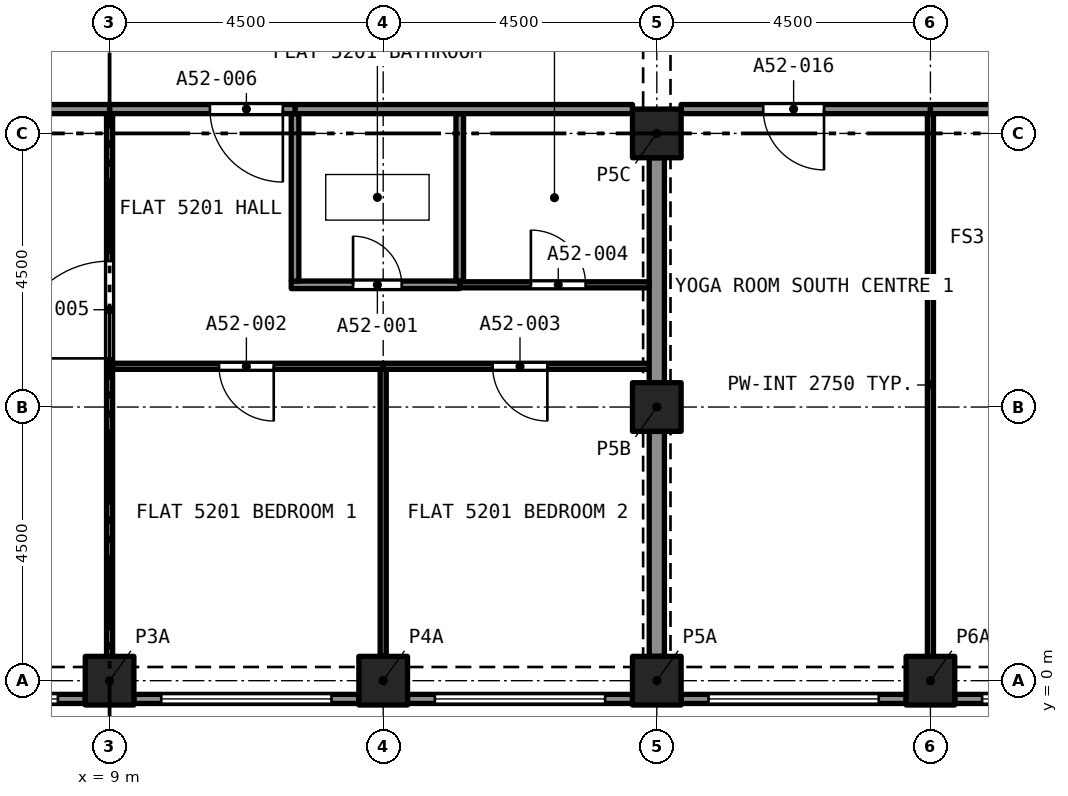
"""IFC4 building model, lengths in metres.
Left out: names, types, materials, properties, quantities, classifications, styles, units other than length and angle.
Written with IfcOpenShell. Run it as: python <this file> out.ifc"""

import sys

from ifc_helpers import new_model, si_unit, direction, frame, frame_2d, origin, origin_2d, place, context, subcontext, project, spatial, rectangle, extrude, element, fill, save


model = new_model("IFC4")
c1 = context("Model", 3, precision=1e-05, world=origin(), true_north=direction((0.0, 1.0)))
c2 = subcontext(c1, "Body", "Model", "MODEL_VIEW")
j1 = project(units=[si_unit("LENGTHUNIT", "METRE"), si_unit("PLANEANGLEUNIT", "RADIAN")], contexts=[c1])
p1 = place(None, origin())
s1 = spatial("IfcSite", under=j1, at=p1, CompositionType="ELEMENT")
p2 = place(p1, origin())
s2 = spatial("IfcBuilding", under=s1, at=p2, CompositionType="ELEMENT")
p3 = place(p2, frame((0.0, 0.0, 189.1)))
s3 = spatial("IfcBuildingStorey", under=s2, at=p3, CompositionType="ELEMENT", Elevation=189.1)
for number, where, z_axis, x_axis in (
    (1, (9.0, 0.0, 0.0), (0.0, 0.0, 1.0), (1.0, 0.0, 0.0)),
    (2, (13.5, 0.0, 0.0), (0.0, 0.0, 1.0), (1.0, 0.0, 0.0)),
    (3, (18.0, 0.0, 0.0), (0.0, 0.0, 1.0), (1.0, 0.0, 0.0)),
    (4, (22.5, 0.0, 0.0), (0.0, 0.0, 1.0), (1.0, 0.0, 0.0)),
    (5, (18.0, 4.5, 0.0), (0.0, 0.0, 1.0), (1.0, 0.0, 0.0)),
    (6, (18.0, 9.0, 0.0), (0.0, 0.0, 1.0), (1.0, 0.0, 0.0)),
):
    element("IfcColumn", number, at=place(p3, frame(where, z_axis=z_axis, x_axis=x_axis)), inside=s3, PredefinedType="COLUMN", context=c2, shape_type="SweptSolid", body=[
        extrude(rectangle(XDim=0.8, YDim=0.8, at=origin_2d()), origin(), (0.0, 0.0, 1.0), 3.2),
    ])
p4 = place(p3, frame((8.6, -0.3, 0.0), z_axis=(0.0, 0.0, 1.0), x_axis=(-1.0, 0.0, 0.0)))
e7 = element("IfcWall", 7, at=p4, inside=s3, PredefinedType="SOLIDWALL", context=c2, shape_type="SweptSolid", body=[
    extrude(rectangle(XDim=3.7, YDim=0.15, at=frame_2d((1.85, 0.0))), origin(), (0.0, 0.0, 1.0), 3.2),
])
p5 = place(p4, frame((0.45, 0.0, 0.45)))
e8 = element("IfcOpeningElement", 8, at=p5, cuts=e7, PredefinedType="OPENING", context=c2, shape_type="SweptSolid", body=[
    extrude(rectangle(XDim=2.8, YDim=1.95, at=frame_2d((1.4, 0.975))), frame((0.0, 0.085, 0.0), z_axis=(0.0, -1.0, 0.0), x_axis=(1.0, 0.0, 0.0)), (0.0, 0.0, 1.0), 0.17),
])
p6 = place(p3, frame((13.1, -0.3, 0.0), z_axis=(0.0, 0.0, 1.0), x_axis=(-1.0, 0.0, 0.0)))
e9 = element("IfcWall", 9, at=p6, inside=s3, PredefinedType="SOLIDWALL", context=c2, shape_type="SweptSolid", body=[
    extrude(rectangle(XDim=3.7, YDim=0.15, at=frame_2d((1.85, 0.0))), origin(), (0.0, 0.0, 1.0), 3.2),
])
p7 = place(p6, frame((0.45, 0.0, 0.45)))
e10 = element("IfcOpeningElement", 10, at=p7, cuts=e9, PredefinedType="OPENING", context=c2, shape_type="SweptSolid", body=[
    extrude(rectangle(XDim=2.8, YDim=1.95, at=frame_2d((1.4, 0.975))), frame((0.0, 0.085, 0.0), z_axis=(0.0, -1.0, 0.0), x_axis=(1.0, 0.0, 0.0)), (0.0, 0.0, 1.0), 0.17),
])
p8 = place(p3, frame((17.6, -0.3, 0.0), z_axis=(0.0, 0.0, 1.0), x_axis=(-1.0, 0.0, 0.0)))
e11 = element("IfcWall", 11, at=p8, inside=s3, PredefinedType="SOLIDWALL", context=c2, shape_type="SweptSolid", body=[
    extrude(rectangle(XDim=3.7, YDim=0.15, at=frame_2d((1.85, 0.0))), origin(), (0.0, 0.0, 1.0), 3.2),
])
p9 = place(p8, frame((0.45, 0.0, 0.45)))
e12 = element("IfcOpeningElement", 12, at=p9, cuts=e11, PredefinedType="OPENING", context=c2, shape_type="SweptSolid", body=[
    extrude(rectangle(XDim=2.8, YDim=1.95, at=frame_2d((1.4, 0.975))), frame((0.0, 0.085, 0.0), z_axis=(0.0, -1.0, 0.0), x_axis=(1.0, 0.0, 0.0)), (0.0, 0.0, 1.0), 0.17),
])
p10 = place(p3, frame((22.1, -0.3, 0.0), z_axis=(0.0, 0.0, 1.0), x_axis=(-1.0, 0.0, 0.0)))
e13 = element("IfcWall", 13, at=p10, inside=s3, PredefinedType="SOLIDWALL", context=c2, shape_type="SweptSolid", body=[
    extrude(rectangle(XDim=3.7, YDim=0.15, at=frame_2d((1.85, 0.0))), origin(), (0.0, 0.0, 1.0), 3.2),
])
p11 = place(p10, frame((0.45, 0.0, 0.45)))
e14 = element("IfcOpeningElement", 14, at=p11, cuts=e13, PredefinedType="OPENING", context=c2, shape_type="SweptSolid", body=[
    extrude(rectangle(XDim=2.8, YDim=1.95, at=frame_2d((1.4, 0.975))), frame((0.0, 0.085, 0.0), z_axis=(0.0, -1.0, 0.0), x_axis=(1.0, 0.0, 0.0)), (0.0, 0.0, 1.0), 0.17),
])
p12 = place(p3, frame((26.6, -0.3, 0.0), z_axis=(0.0, 0.0, 1.0), x_axis=(-1.0, 0.0, 0.0)))
e15 = element("IfcWall", 15, at=p12, inside=s3, PredefinedType="SOLIDWALL", context=c2, shape_type="SweptSolid", body=[
    extrude(rectangle(XDim=3.7, YDim=0.15, at=frame_2d((1.85, 0.0))), origin(), (0.0, 0.0, 1.0), 3.2),
])
p13 = place(p12, frame((0.45, 0.0, 0.45)))
e16 = element("IfcOpeningElement", 16, at=p13, cuts=e15, PredefinedType="OPENING", context=c2, shape_type="SweptSolid", body=[
    extrude(rectangle(XDim=2.8, YDim=1.95, at=frame_2d((1.4, 0.975))), frame((0.0, 0.085, 0.0), z_axis=(0.0, -1.0, 0.0), x_axis=(1.0, 0.0, 0.0)), (0.0, 0.0, 1.0), 0.17),
])
p14 = place(p3, frame((11.988, 6.51, 0.0), z_axis=(0.0, 0.0, 1.0), x_axis=(1.0, 0.0, 0.0)))
e17 = element("IfcWall", 17, at=p14, inside=s3, PredefinedType="PARTITIONING", context=c2, shape_type="SweptSolid", body=[
    extrude(rectangle(XDim=2.771, YDim=0.125, at=frame_2d((1.385, 0.0))), origin(), (0.0, 0.0, 1.0), 2.9),
])
p15 = place(p14, frame((1.017, 0.0, 0.0)))
e18 = element("IfcOpeningElement", 18, at=p15, cuts=e17, PredefinedType="OPENING", context=c2, shape_type="SweptSolid", body=[
    extrude(rectangle(XDim=0.8, YDim=2.1, at=frame_2d((0.4, 1.05))), frame((0.0, 0.073, 0.0), z_axis=(0.0, -1.0, 0.0), x_axis=(1.0, 0.0, 0.0)), (0.0, 0.0, 1.0), 0.145),
])
for number, where, z_axis, x_axis in (
    (19, (12.05, 6.573, 0.0), (0.0, 0.0, 1.0), (0.0, 1.0, 0.0)),
    (20, (14.759, 6.573, 0.0), (0.0, 0.0, 1.0), (0.0, 1.0, 0.0)),
):
    element("IfcWall", number, at=place(p3, frame(where, z_axis=z_axis, x_axis=x_axis)), inside=s3, PredefinedType="PARTITIONING", context=c2, shape_type="SweptSolid", body=[
        extrude(rectangle(XDim=2.752, YDim=0.125, at=frame_2d((1.376, 0.0))), origin(), (0.0, 0.0, 1.0), 2.9),
    ])
p16 = place(p3, frame((12.05, 9.4, 0.0), z_axis=(0.0, 0.0, 1.0), x_axis=(1.0, 0.0, 0.0)))
e21 = element("IfcWall", 21, at=p16, inside=s3, PredefinedType="PARTITIONING", context=c2, shape_type="SweptSolid", body=[
    extrude(rectangle(XDim=5.55, YDim=0.15, at=frame_2d((2.775, 0.0))), origin(), (0.0, 0.0, 1.0), 2.9),
])
p17 = place(p3, frame((13.5, 0.4, 0.0), z_axis=(0.0, 0.0, 1.0), x_axis=(0.0, 1.0, 0.0)))
e22 = element("IfcWall", 22, at=p17, inside=s3, PredefinedType="PARTITIONING", context=c2, shape_type="SweptSolid", body=[
    extrude(rectangle(XDim=4.72, YDim=0.1, at=frame_2d((2.36, 0.0))), origin(), (0.0, 0.0, 1.0), 2.9),
])
p18 = place(p3, frame((13.5, 5.17, 0.0), z_axis=(0.0, 0.0, 1.0), x_axis=(-1.0, 0.0, 0.0)))
e23 = element("IfcWall", 23, at=p18, inside=s3, PredefinedType="PARTITIONING", context=c2, shape_type="SweptSolid", body=[
    extrude(rectangle(XDim=4.45, YDim=0.1, at=frame_2d((2.225, 0.0))), origin(), (0.0, 0.0, 1.0), 2.9),
])
p19 = place(p18, frame((1.8, 0.0, 0.0)))
e24 = element("IfcOpeningElement", 24, at=p19, cuts=e23, PredefinedType="OPENING", context=c2, shape_type="SweptSolid", body=[
    extrude(rectangle(XDim=0.9, YDim=2.1, at=frame_2d((0.45, 1.05))), frame((0.0, 0.06, 0.0), z_axis=(0.0, -1.0, 0.0), x_axis=(1.0, 0.0, 0.0)), (0.0, 0.0, 1.0), 0.12),
])
p20 = place(p3, frame((9.0, 0.4, 0.0), z_axis=(0.0, 0.0, 1.0), x_axis=(0.0, 1.0, 0.0)))
e25 = element("IfcWall", 25, at=p20, inside=s3, PredefinedType="PARTITIONING", context=c2, shape_type="SweptSolid", body=[
    extrude(rectangle(XDim=4.77, YDim=0.1, at=frame_2d((2.385, 0.0))), origin(), (0.0, 0.0, 1.0), 2.9),
])
p21 = place(p3, frame((17.875, 5.17, 0.0), z_axis=(0.0, 0.0, 1.0), x_axis=(-1.0, 0.0, 0.0)))
e26 = element("IfcWall", 26, at=p21, inside=s3, PredefinedType="PARTITIONING", context=c2, shape_type="SweptSolid", body=[
    extrude(rectangle(XDim=4.375, YDim=0.1, at=frame_2d((2.188, 0.0))), origin(), (0.0, 0.0, 1.0), 2.9),
])
p22 = place(p21, frame((1.675, 0.0, 0.0)))
e27 = element("IfcOpeningElement", 27, at=p22, cuts=e26, PredefinedType="OPENING", context=c2, shape_type="SweptSolid", body=[
    extrude(rectangle(XDim=0.9, YDim=2.1, at=frame_2d((0.45, 1.05))), frame((0.0, 0.06, 0.0), z_axis=(0.0, -1.0, 0.0), x_axis=(1.0, 0.0, 0.0)), (0.0, 0.0, 1.0), 0.12),
])
for number, where, z_axis, x_axis in (
    (28, (18.0, 4.9, 0.0), (0.0, 0.0, 1.0), (0.0, 1.0, 0.0)),
    (29, (18.0, 0.4, 0.0), (0.0, 0.0, 1.0), (0.0, 1.0, 0.0)),
):
    element("IfcWall", number, at=place(p3, frame(where, z_axis=z_axis, x_axis=x_axis)), inside=s3, PredefinedType="PARTITIONING", context=c2, shape_type="SweptSolid", body=[
        extrude(rectangle(XDim=3.7, YDim=0.25, at=frame_2d((1.85, 0.0))), origin(), (0.0, 0.0, 1.0), 2.38),
    ])
p23 = place(p3, frame((14.759, 6.51, 0.0), z_axis=(0.0, 0.0, 1.0), x_axis=(1.0, 0.0, 0.0)))
e30 = element("IfcWall", 30, at=p23, inside=s3, PredefinedType="PARTITIONING", context=c2, shape_type="SweptSolid", body=[
    extrude(rectangle(XDim=3.116, YDim=0.1, at=frame_2d((1.558, 0.0))), origin(), (0.0, 0.0, 1.0), 2.9),
])
p24 = place(p23, frame((1.171, 0.0, 0.0)))
e31 = element("IfcOpeningElement", 31, at=p24, cuts=e30, PredefinedType="OPENING", context=c2, shape_type="SweptSolid", body=[
    extrude(rectangle(XDim=0.9, YDim=2.1, at=frame_2d((0.45, 1.05))), frame((0.0, 0.06, 0.0), z_axis=(0.0, -1.0, 0.0), x_axis=(1.0, 0.0, 0.0)), (0.0, 0.0, 1.0), 0.12),
])
p25 = place(p3, frame((9.0, 5.17, 0.0), z_axis=(0.0, 0.0, 1.0), x_axis=(0.0, 1.0, 0.0)))
e32 = element("IfcWall", 32, at=p25, inside=s3, PredefinedType="PARTITIONING", context=c2, shape_type="SweptSolid", body=[
    extrude(rectangle(XDim=4.155, YDim=0.1, at=frame_2d((2.078, 0.0))), origin(), (0.0, 0.0, 1.0), 2.9),
])
p26 = place(p25, frame((0.13, 0.0, 0.0)))
e33 = element("IfcOpeningElement", 33, at=p26, cuts=e32, PredefinedType="OPENING", context=c2, shape_type="SweptSolid", body=[
    extrude(rectangle(XDim=1.6, YDim=2.1, at=frame_2d((0.8, 1.05))), frame((0.0, 0.06, 0.0), z_axis=(0.0, -1.0, 0.0), x_axis=(1.0, 0.0, 0.0)), (0.0, 0.0, 1.0), 0.12),
])
p27 = place(p3, frame((12.05, 9.4, 0.0), z_axis=(0.0, 0.0, 1.0), x_axis=(-1.0, 0.0, 0.0)))
e34 = element("IfcWall", 34, at=p27, inside=s3, PredefinedType="PARTITIONING", context=c2, shape_type="SweptSolid", body=[
    extrude(rectangle(XDim=3.05, YDim=0.15, at=frame_2d((1.525, 0.0))), origin(), (0.0, 0.0, 1.0), 2.9),
])
p28 = place(p27, frame((0.2, 0.0, 0.0)))
e35 = element("IfcOpeningElement", 35, at=p28, cuts=e34, PredefinedType="OPENING", context=c2, shape_type="SweptSolid", body=[
    extrude(rectangle(XDim=1.2, YDim=2.4, at=frame_2d((0.6, 1.2))), frame((0.0, 0.085, 0.0), z_axis=(0.0, -1.0, 0.0), x_axis=(1.0, 0.0, 0.0)), (0.0, 0.0, 1.0), 0.17),
])
p29 = place(p3, frame((0.4, 9.4, 0.0), z_axis=(0.0, 0.0, 1.0), x_axis=(1.0, 0.0, 0.0)))
e36 = element("IfcWall", 36, at=p29, inside=s3, PredefinedType="PARTITIONING", context=c2, shape_type="SweptSolid", body=[
    extrude(rectangle(XDim=8.6, YDim=0.15, at=frame_2d((4.3, 0.0))), origin(), (0.0, 0.0, 1.0), 2.9),
])
p30 = place(p3, frame((22.5, 0.4, 0.0), z_axis=(0.0, 0.0, 1.0), x_axis=(0.0, 1.0, 0.0)))
e37 = element("IfcWall", 37, at=p30, inside=s3, PredefinedType="PARTITIONING", context=c2, shape_type="SweptSolid", body=[
    extrude(rectangle(XDim=8.925, YDim=0.1, at=frame_2d((4.462, 0.0))), origin(), (0.0, 0.0, 1.0), 2.75),
])
p31 = place(p3, frame((22.5, 9.4, 0.0), z_axis=(0.0, 0.0, 1.0), x_axis=(-1.0, 0.0, 0.0)))
e38 = element("IfcWall", 38, at=p31, inside=s3, PredefinedType="PARTITIONING", context=c2, shape_type="SweptSolid", body=[
    extrude(rectangle(XDim=4.1, YDim=0.15, at=frame_2d((2.05, 0.0))), origin(), (0.0, 0.0, 1.0), 2.75),
])
p32 = place(p31, frame((1.75, 0.0, 0.0)))
e39 = element("IfcOpeningElement", 39, at=p32, cuts=e38, PredefinedType="OPENING", context=c2, shape_type="SweptSolid", body=[
    extrude(rectangle(XDim=1.0, YDim=2.1, at=frame_2d((0.5, 1.05))), frame((0.0, 0.085, 0.0), z_axis=(0.0, -1.0, 0.0), x_axis=(1.0, 0.0, 0.0)), (0.0, 0.0, 1.0), 0.17),
])
p33 = place(p3, frame((31.1, 9.4, 0.0), z_axis=(0.0, 0.0, 1.0), x_axis=(-1.0, 0.0, 0.0)))
e40 = element("IfcWall", 40, at=p33, inside=s3, PredefinedType="PARTITIONING", context=c2, shape_type="SweptSolid", body=[
    extrude(rectangle(XDim=8.6, YDim=0.15, at=frame_2d((4.3, 0.0))), origin(), (0.0, 0.0, 1.0), 2.75),
])
p34 = place(p33, frame((3.8, 0.0, 0.0)))
e41 = element("IfcOpeningElement", 41, at=p34, cuts=e40, PredefinedType="OPENING", context=c2, shape_type="SweptSolid", body=[
    extrude(rectangle(XDim=1.0, YDim=2.1, at=frame_2d((0.5, 1.05))), frame((0.0, 0.085, 0.0), z_axis=(0.0, -1.0, 0.0), x_axis=(1.0, 0.0, 0.0)), (0.0, 0.0, 1.0), 0.17),
])
p35 = place(p5, origin())
e42 = element("IfcWindow", 42, at=p35, inside=s3, PartitioningType="SINGLE_PANEL", PredefinedType="WINDOW", context=c2, shape_type="SweptSolid", body=[
    extrude(rectangle(XDim=2.8, YDim=1.95, at=frame_2d((1.4, 0.975))), frame((0.0, 0.03, 0.0), z_axis=(0.0, -1.0, 0.0), x_axis=(1.0, 0.0, 0.0)), (0.0, 0.0, 1.0), 0.06),
])
fill(e8, e42)
p36 = place(p7, origin())
e43 = element("IfcWindow", 43, at=p36, inside=s3, PartitioningType="SINGLE_PANEL", PredefinedType="WINDOW", context=c2, shape_type="SweptSolid", body=[
    extrude(rectangle(XDim=2.8, YDim=1.95, at=frame_2d((1.4, 0.975))), frame((0.0, 0.03, 0.0), z_axis=(0.0, -1.0, 0.0), x_axis=(1.0, 0.0, 0.0)), (0.0, 0.0, 1.0), 0.06),
])
fill(e10, e43)
p37 = place(p9, origin())
e44 = element("IfcWindow", 44, at=p37, inside=s3, PartitioningType="SINGLE_PANEL", PredefinedType="WINDOW", context=c2, shape_type="SweptSolid", body=[
    extrude(rectangle(XDim=2.8, YDim=1.95, at=frame_2d((1.4, 0.975))), frame((0.0, 0.03, 0.0), z_axis=(0.0, -1.0, 0.0), x_axis=(1.0, 0.0, 0.0)), (0.0, 0.0, 1.0), 0.06),
])
fill(e12, e44)
p38 = place(p11, origin())
e45 = element("IfcWindow", 45, at=p38, inside=s3, PartitioningType="SINGLE_PANEL", PredefinedType="WINDOW", context=c2, shape_type="SweptSolid", body=[
    extrude(rectangle(XDim=2.8, YDim=1.95, at=frame_2d((1.4, 0.975))), frame((0.0, 0.03, 0.0), z_axis=(0.0, -1.0, 0.0), x_axis=(1.0, 0.0, 0.0)), (0.0, 0.0, 1.0), 0.06),
])
fill(e14, e45)
p39 = place(p13, origin())
e46 = element("IfcWindow", 46, at=p39, inside=s3, PartitioningType="SINGLE_PANEL", PredefinedType="WINDOW", context=c2, shape_type="SweptSolid", body=[
    extrude(rectangle(XDim=2.8, YDim=1.95, at=frame_2d((1.4, 0.975))), frame((0.0, 0.03, 0.0), z_axis=(0.0, -1.0, 0.0), x_axis=(1.0, 0.0, 0.0)), (0.0, 0.0, 1.0), 0.06),
])
fill(e16, e46)
p40 = place(p15, origin())
e47 = element("IfcDoor", 47, at=p40, inside=s3, OperationType="SINGLE_SWING_RIGHT", PredefinedType="DOOR", context=c2, shape_type="SweptSolid", body=[
    extrude(rectangle(XDim=0.8, YDim=2.1, at=frame_2d((0.4, 1.05))), frame((0.0, 0.025, 0.0), z_axis=(0.0, -1.0, 0.0), x_axis=(1.0, 0.0, 0.0)), (0.0, 0.0, 1.0), 0.05),
])
fill(e18, e47)
p41 = place(p19, origin())
e48 = element("IfcDoor", 48, at=p41, inside=s3, OperationType="SINGLE_SWING_RIGHT", PredefinedType="DOOR", context=c2, shape_type="SweptSolid", body=[
    extrude(rectangle(XDim=0.9, YDim=2.1, at=frame_2d((0.45, 1.05))), frame((0.0, 0.025, 0.0), z_axis=(0.0, -1.0, 0.0), x_axis=(1.0, 0.0, 0.0)), (0.0, 0.0, 1.0), 0.05),
])
fill(e24, e48)
p42 = place(p22, origin())
e49 = element("IfcDoor", 49, at=p42, inside=s3, OperationType="SINGLE_SWING_LEFT", PredefinedType="DOOR", context=c2, shape_type="SweptSolid", body=[
    extrude(rectangle(XDim=0.9, YDim=2.1, at=frame_2d((0.45, 1.05))), frame((0.0, 0.025, 0.0), z_axis=(0.0, -1.0, 0.0), x_axis=(1.0, 0.0, 0.0)), (0.0, 0.0, 1.0), 0.05),
])
fill(e27, e49)
p43 = place(p24, origin())
e50 = element("IfcDoor", 50, at=p43, inside=s3, OperationType="SINGLE_SWING_RIGHT", PredefinedType="DOOR", context=c2, shape_type="SweptSolid", body=[
    extrude(rectangle(XDim=0.9, YDim=2.1, at=frame_2d((0.45, 1.05))), frame((0.0, 0.025, 0.0), z_axis=(0.0, -1.0, 0.0), x_axis=(1.0, 0.0, 0.0)), (0.0, 0.0, 1.0), 0.05),
])
fill(e31, e50)
p44 = place(p26, origin())
e51 = element("IfcDoor", 51, at=p44, inside=s3, OperationType="SINGLE_SWING_LEFT", PredefinedType="DOOR", context=c2, shape_type="SweptSolid", body=[
    extrude(rectangle(XDim=1.6, YDim=2.1, at=frame_2d((0.8, 1.05))), frame((0.0, 0.025, 0.0), z_axis=(0.0, -1.0, 0.0), x_axis=(1.0, 0.0, 0.0)), (0.0, 0.0, 1.0), 0.05),
])
fill(e33, e51)
p45 = place(p28, origin())
e52 = element("IfcDoor", 52, at=p45, inside=s3, OperationType="SINGLE_SWING_LEFT", PredefinedType="DOOR", context=c2, shape_type="SweptSolid", body=[
    extrude(rectangle(XDim=1.2, YDim=2.4, at=frame_2d((0.6, 1.2))), frame((0.0, 0.025, 0.0), z_axis=(0.0, -1.0, 0.0), x_axis=(1.0, 0.0, 0.0)), (0.0, 0.0, 1.0), 0.05),
])
fill(e35, e52)
p46 = place(p32, origin())
e53 = element("IfcDoor", 53, at=p46, inside=s3, OperationType="SINGLE_SWING_RIGHT", PredefinedType="DOOR", context=c2, shape_type="SweptSolid", body=[
    extrude(rectangle(XDim=1.0, YDim=2.1, at=frame_2d((0.5, 1.05))), frame((0.0, 0.025, 0.0), z_axis=(0.0, -1.0, 0.0), x_axis=(1.0, 0.0, 0.0)), (0.0, 0.0, 1.0), 0.05),
])
fill(e39, e53)
save(model, sys.argv[1])
